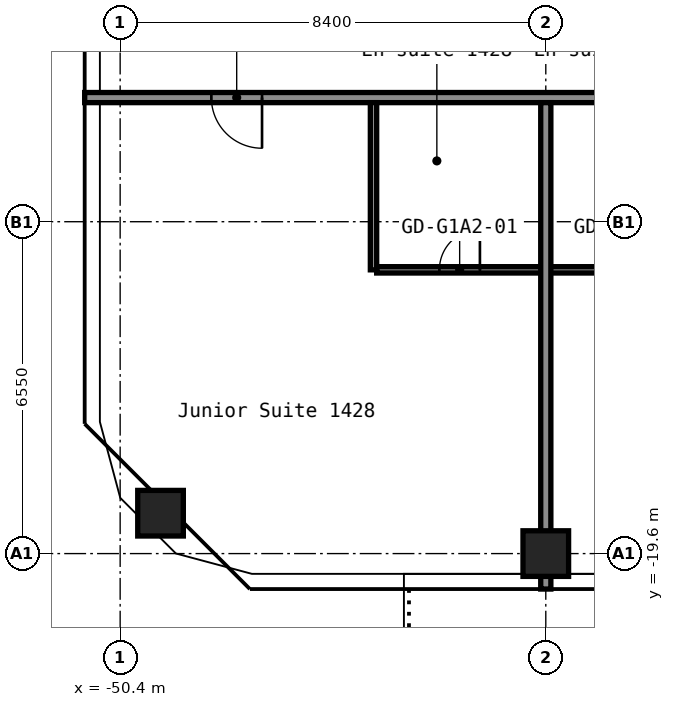
"""IFC4 building model, lengths in metres.
Left out: names, types, materials, properties, quantities, classifications, styles, units other than length and angle.
Written with IfcOpenShell. Run it as: python <this file> out.ifc"""

import sys

from ifc_helpers import new_model, si_unit, direction, frame, frame_2d, origin, origin_2d, place, context, subcontext, project, spatial, rectangle, hollow_rectangle, extrude, element, fill, save


model = new_model("IFC4")
c1 = context("Model", 3, precision=1e-05, world=origin(), true_north=direction((0.0, 1.0)))
c2 = subcontext(c1, "Body", "Model", "MODEL_VIEW")
j1 = project(units=[si_unit("LENGTHUNIT", "METRE"), si_unit("PLANEANGLEUNIT", "RADIAN")], contexts=[c1])
p1 = place(None, origin())
s1 = spatial("IfcSite", under=j1, at=p1, CompositionType="ELEMENT")
p2 = place(p1, origin())
s2 = spatial("IfcBuilding", under=s1, at=p2, CompositionType="ELEMENT")
p3 = place(p2, frame((0.0, 0.0, 51.8)))
s3 = spatial("IfcBuildingStorey", under=s2, at=p3, CompositionType="ELEMENT", Elevation=51.8)
for number, where, z_axis, x_axis in (
    (1, (-49.603, -18.803, 0.0), (0.0, 0.0, 1.0), (1.0, 0.0, 0.0)),
    (2, (-42.0, -19.6, 0.0), (0.0, 0.0, 1.0), (1.0, 0.0, 0.0)),
):
    element("IfcColumn", number, at=place(p3, frame(where, z_axis=z_axis, x_axis=x_axis)), inside=s3, PredefinedType="COLUMN", context=c2, shape_type="SweptSolid", body=[
        extrude(hollow_rectangle(XDim=0.9, YDim=0.9, WallThickness=0.036, at=origin_2d()), origin(), (0.0, 0.0, 1.0), 2.8),
    ])
p4 = place(p3, frame((-45.337, -14.0, 0.0), z_axis=(0.0, 0.0, 1.0), x_axis=(1.0, 0.0, 0.0)))
e3 = element("IfcWall", 3, at=p4, inside=s3, PredefinedType="PARTITIONING", context=c2, shape_type="SweptSolid", body=[
    extrude(rectangle(XDim=6.675, YDim=0.125, at=frame_2d((3.337, 0.0))), origin(), (0.0, 0.0, 1.0), 2.8),
])
p5 = place(p4, frame((1.238, 0.0, 0.0)))
e4 = element("IfcOpeningElement", 4, at=p5, cuts=e3, PredefinedType="OPENING", context=c2, shape_type="SweptSolid", body=[
    extrude(rectangle(XDim=0.8, YDim=2.1, at=frame_2d((0.4, 1.05))), frame((0.0, 0.073, 0.0), z_axis=(0.0, -1.0, 0.0), x_axis=(1.0, 0.0, 0.0)), (0.0, 0.0, 1.0), 0.145),
])
p6 = place(p4, frame((4.637, 0.0, 0.0)))
e5 = element("IfcOpeningElement", 5, at=p6, cuts=e3, PredefinedType="OPENING", context=c2, shape_type="SweptSolid", body=[
    extrude(rectangle(XDim=0.8, YDim=2.1, at=frame_2d((0.4, 1.05))), frame((0.0, 0.073, 0.0), z_axis=(0.0, -1.0, 0.0), x_axis=(1.0, 0.0, 0.0)), (0.0, 0.0, 1.0), 0.145),
])
p7 = place(p3, frame((-51.1, -10.6, 0.0), z_axis=(0.0, 0.0, 1.0), x_axis=(1.0, 0.0, 0.0)))
e6 = element("IfcWall", 6, at=p7, inside=s3, PredefinedType="PARTITIONING", context=c2, shape_type="SweptSolid", body=[
    extrude(rectangle(XDim=34.3, YDim=0.2, at=frame_2d((17.15, 0.0))), origin(), (0.0, 0.0, 1.0), 2.8),
])
p8 = place(p7, frame((2.5, 0.0, 0.0)))
e7 = element("IfcOpeningElement", 7, at=p8, cuts=e6, PredefinedType="OPENING", context=c2, shape_type="SweptSolid", body=[
    extrude(rectangle(XDim=1.0, YDim=2.1, at=frame_2d((0.5, 1.05))), frame((0.0, 0.11, 0.0), z_axis=(0.0, -1.0, 0.0), x_axis=(1.0, 0.0, 0.0)), (0.0, 0.0, 1.0), 0.22),
])
p9 = place(p7, frame((14.5, 0.0, 0.0)))
e8 = element("IfcOpeningElement", 8, at=p9, cuts=e6, PredefinedType="OPENING", context=c2, shape_type="SweptSolid", body=[
    extrude(rectangle(XDim=1.0, YDim=2.1, at=frame_2d((0.5, 1.05))), frame((0.0, 0.11, 0.0), z_axis=(0.0, -1.0, 0.0), x_axis=(1.0, 0.0, 0.0)), (0.0, 0.0, 1.0), 0.22),
])
p10 = place(p7, frame((22.9, 0.0, 0.0)))
e9 = element("IfcOpeningElement", 9, at=p10, cuts=e6, PredefinedType="OPENING", context=c2, shape_type="SweptSolid", body=[
    extrude(rectangle(XDim=1.0, YDim=2.1, at=frame_2d((0.5, 1.05))), frame((0.0, 0.11, 0.0), z_axis=(0.0, -1.0, 0.0), x_axis=(1.0, 0.0, 0.0)), (0.0, 0.0, 1.0), 0.22),
])
p11 = place(p7, frame((27.9, 0.0, 0.0)))
e10 = element("IfcOpeningElement", 10, at=p11, cuts=e6, PredefinedType="OPENING", context=c2, shape_type="SweptSolid", body=[
    extrude(rectangle(XDim=1.0, YDim=2.1, at=frame_2d((0.5, 1.05))), frame((0.0, 0.11, 0.0), z_axis=(0.0, -1.0, 0.0), x_axis=(1.0, 0.0, 0.0)), (0.0, 0.0, 1.0), 0.22),
])
p12 = place(p3, frame((-45.4, -14.0, 0.0), z_axis=(0.0, 0.0, 1.0), x_axis=(0.0, 1.0, 0.0)))
e11 = element("IfcWall", 11, at=p12, inside=s3, PredefinedType="PARTITIONING", context=c2, shape_type="SweptSolid", body=[
    extrude(rectangle(XDim=3.3, YDim=0.125, at=frame_2d((1.65, 0.0))), origin(), (0.0, 0.0, 1.0), 2.8),
])
p13 = place(p3, frame((-42.0, -20.3, 0.0), z_axis=(0.0, 0.0, 1.0), x_axis=(0.0, 1.0, 0.0)))
e12 = element("IfcWall", 12, at=p13, inside=s3, PredefinedType="PARTITIONING", context=c2, shape_type="SweptSolid", body=[
    extrude(rectangle(XDim=9.6, YDim=0.2, at=frame_2d((4.8, 0.0))), origin(), (0.0, 0.0, 1.0), 2.8),
])
p14 = place(p5, origin())
e13 = element("IfcDoor", 13, at=p14, inside=s3, OperationType="SINGLE_SWING_LEFT", PredefinedType="DOOR", context=c2, shape_type="SweptSolid", body=[
    extrude(rectangle(XDim=0.8, YDim=2.1, at=frame_2d((0.4, 1.05))), frame((0.0, 0.025, 0.0), z_axis=(0.0, -1.0, 0.0), x_axis=(1.0, 0.0, 0.0)), (0.0, 0.0, 1.0), 0.05),
])
fill(e4, e13)
p15 = place(p8, origin())
e14 = element("IfcDoor", 14, at=p15, inside=s3, OperationType="SINGLE_SWING_RIGHT", PredefinedType="DOOR", context=c2, shape_type="SweptSolid", body=[
    extrude(rectangle(XDim=1.0, YDim=2.1, at=frame_2d((0.5, 1.05))), frame((0.0, 0.025, 0.0), z_axis=(0.0, -1.0, 0.0), x_axis=(1.0, 0.0, 0.0)), (0.0, 0.0, 1.0), 0.05),
])
fill(e7, e14)
save(model, sys.argv[1])
